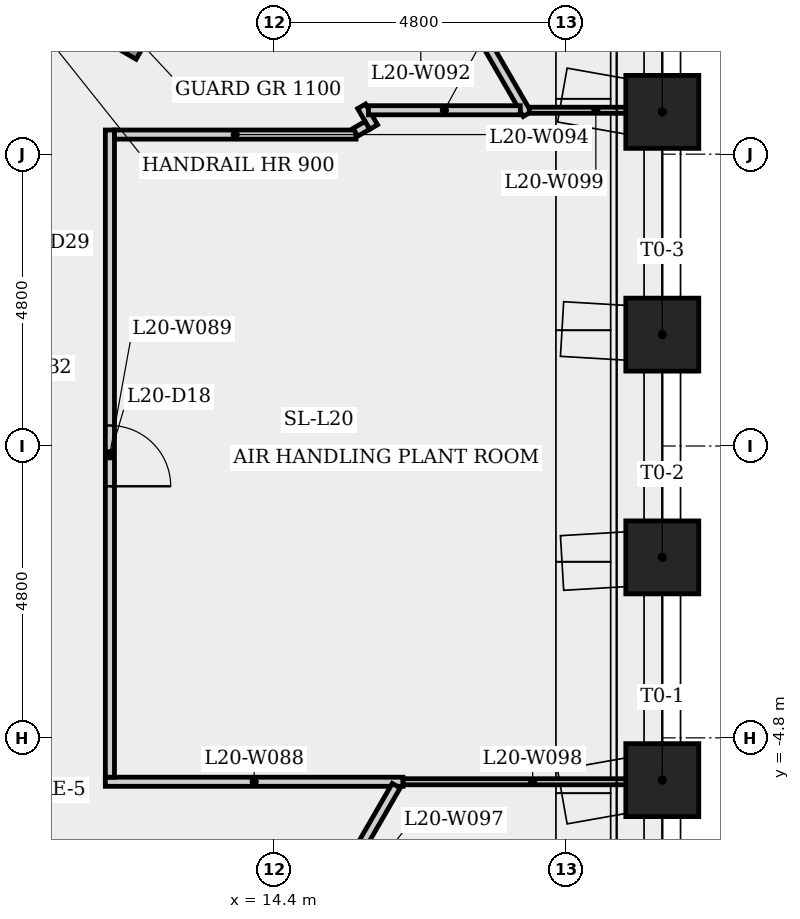
"""IFC4 building model, lengths in metres.
Left out: names, types, materials, properties, quantities, classifications, styles, units other than length and angle.
Written with IfcOpenShell. Run it as: python <this file> out.ifc"""

import sys

from ifc_helpers import new_model, si_unit, direction, frame, frame_2d, origin, origin_2d, place, context, subcontext, project, spatial, rectangle, extrude, element, fill, save


model = new_model("IFC4")
c1 = context("Model", 3, precision=1e-05, world=origin(), true_north=direction((0.0, 1.0)))
c2 = subcontext(c1, "Body", "Model", "MODEL_VIEW")
j1 = project(units=[si_unit("LENGTHUNIT", "METRE"), si_unit("PLANEANGLEUNIT", "RADIAN")], contexts=[c1])
p1 = place(None, origin())
s1 = spatial("IfcSite", under=j1, at=p1, CompositionType="ELEMENT")
p2 = place(p1, origin())
s2 = spatial("IfcBuilding", under=s1, at=p2, CompositionType="ELEMENT")
p3 = place(p2, frame((0.0, 0.0, 78.3)))
s3 = spatial("IfcBuildingStorey", under=s2, at=p3, CompositionType="ELEMENT", Elevation=78.3)
for number, where, z_axis, x_axis in (
    (1, (20.785, -5.495, 0.0), (0.0, 0.0, 1.0), (1.0, 0.0, 0.0)),
    (2, (20.785, -1.832, 0.0), (0.0, 0.0, 1.0), (1.0, 0.0, 0.0)),
    (3, (20.785, 1.832, 0.0), (0.0, 0.0, 1.0), (1.0, 0.0, 0.0)),
    (4, (20.785, 5.495, 0.0), (0.0, 0.0, 1.0), (1.0, 0.0, 0.0)),
):
    element("IfcColumn", number, at=place(p3, frame(where, z_axis=z_axis, x_axis=x_axis)), inside=s3, PredefinedType="COLUMN", context=c2, shape_type="SweptSolid", body=[
        extrude(rectangle(XDim=1.2, YDim=1.2, at=origin_2d()), origin(), (0.0, 0.0, 1.0), 4.45),
    ])
p4 = place(p3, frame((11.625, -5.522, 0.0), z_axis=(0.0, 0.0, 1.0), x_axis=(1.0, 0.0, 0.0)))
e5 = element("IfcWall", 5, at=p4, inside=s3, PredefinedType="PARTITIONING", context=c2, shape_type="SweptSolid", body=[
    extrude(rectangle(XDim=4.896, YDim=0.15, at=frame_2d((2.448, 0.0))), origin(), (0.0, 0.0, 1.0), 4.45),
])
p5 = place(p3, frame((11.7, 5.197, 0.0), z_axis=(0.0, 0.0, 1.0), x_axis=(0.0, -1.0, 0.0)))
e6 = element("IfcWall", 6, at=p5, inside=s3, PredefinedType="PARTITIONING", context=c2, shape_type="SweptSolid", body=[
    extrude(rectangle(XDim=10.645, YDim=0.15, at=frame_2d((5.322, 0.0))), origin(), (0.0, 0.0, 1.0), 4.45),
])
p6 = place(p5, frame((4.86, 0.0, 0.0)))
e7 = element("IfcOpeningElement", 7, at=p6, cuts=e6, PredefinedType="OPENING", context=c2, shape_type="SweptSolid", body=[
    extrude(rectangle(XDim=1.0, YDim=2.1, at=frame_2d((0.5, 1.05))), frame((0.0, 0.085, 0.0), z_axis=(0.0, -1.0, 0.0), x_axis=(1.0, 0.0, 0.0)), (0.0, 0.0, 1.0), 0.17),
])
p7 = place(p3, frame((12.194, 6.47, 0.0), z_axis=(0.0, 0.0, 1.0), x_axis=(-0.866025499775, 0.499999833739, 0.0)))
e8 = element("IfcWall", 8, at=p7, inside=s3, PredefinedType="SHEAR", context=c2, shape_type="SweptSolid", body=[
    extrude(rectangle(XDim=6.4, YDim=0.25, at=frame_2d((3.2, 0.0))), origin(), (0.0, 0.0, 1.0), 4.45),
])
p8 = place(p7, frame((5.25, 0.0, 0.0)))
e9 = element("IfcOpeningElement", 9, at=p8, cuts=e8, PredefinedType="OPENING", context=c2, shape_type="SweptSolid", body=[
    extrude(rectangle(XDim=1.0, YDim=2.1, at=frame_2d((0.5, 1.05))), frame((0.0, 0.135, 0.0), z_axis=(0.0, -1.0, 0.0), x_axis=(1.0, 0.0, 0.0)), (0.0, 0.0, 1.0), 0.27),
])
p9 = place(p3, frame((15.063, 11.517, 0.0), z_axis=(0.0, 0.0, 1.0), x_axis=(0.500015411963, -0.866016505501, 0.0)))
e10 = element("IfcWall", 10, at=p9, inside=s3, PredefinedType="PARTITIONING", context=c2, shape_type="SweptSolid", body=[
    extrude(rectangle(XDim=6.997, YDim=0.15, at=frame_2d((3.499, 0.0))), origin(), (0.0, 0.0, 1.0), 4.45),
])
p10 = place(p9, frame((2.944, 0.0, 0.0)))
e11 = element("IfcOpeningElement", 11, at=p10, cuts=e10, PredefinedType="OPENING", context=c2, shape_type="SweptSolid", body=[
    extrude(rectangle(XDim=1.0, YDim=2.1, at=frame_2d((0.5, 1.05))), frame((0.0, 0.085, 0.0), z_axis=(0.0, -1.0, 0.0), x_axis=(1.0, 0.0, 0.0)), (0.0, 0.0, 1.0), 0.17),
])
p11 = place(p3, frame((15.747, 5.122, 0.0), z_axis=(0.0, 0.0, 1.0), x_axis=(-1.0, 0.0, 0.0)))
e12 = element("IfcWall", 12, at=p11, inside=s3, PredefinedType="PARTITIONING", context=c2, shape_type="SweptSolid", body=[
    extrude(rectangle(XDim=3.972, YDim=0.15, at=frame_2d((1.986, 0.0))), origin(), (0.0, 0.0, 1.0), 4.45),
])
p12 = place(p3, frame((15.84, 5.587, 0.0), z_axis=(0.0, 0.0, 1.0), x_axis=(0.499740345343, -0.866175263579, 0.0)))
e13 = element("IfcWall", 13, at=p12, inside=s3, PredefinedType="PARTITIONING", context=c2, shape_type="SweptSolid", body=[
    extrude(rectangle(XDim=0.394, YDim=0.15, at=frame_2d((0.197, 0.0))), origin(), (0.0, 0.0, 1.0), 4.45),
])
p13 = place(p3, frame((15.934, 5.273, 0.0), z_axis=(0.0, 0.0, 1.0), x_axis=(-0.866256971229, -0.499598698754, 0.0)))
e14 = element("IfcWall", 14, at=p13, inside=s3, PredefinedType="PARTITIONING", context=c2, shape_type="SweptSolid", body=[
    extrude(rectangle(XDim=0.228, YDim=0.15, at=frame_2d((0.114, 0.0))), origin(), (0.0, 0.0, 1.0), 4.45),
])
p14 = place(p3, frame((16.408, -5.587, 0.0), z_axis=(0.0, 0.0, 1.0), x_axis=(-0.499988554908, -0.866032011511, 0.0)))
e15 = element("IfcWall", 15, at=p14, inside=s3, PredefinedType="PARTITIONING", context=c2, shape_type="SweptSolid", body=[
    extrude(rectangle(XDim=8.233, YDim=0.15, at=frame_2d((4.117, 0.0))), origin(), (0.0, 0.0, 1.0), 4.45),
])
p15 = place(p14, frame((3.566, 0.0, 0.0)))
e16 = element("IfcOpeningElement", 16, at=p15, cuts=e15, PredefinedType="OPENING", context=c2, shape_type="SweptSolid", body=[
    extrude(rectangle(XDim=1.1, YDim=2.1, at=frame_2d((0.55, 1.05))), frame((0.0, 0.085, 0.0), z_axis=(0.0, -1.0, 0.0), x_axis=(1.0, 0.0, 0.0)), (0.0, 0.0, 1.0), 0.17),
])
p16 = place(p3, frame((16.521, -5.522, 0.0), z_axis=(0.0, 0.0, 1.0), x_axis=(1.0, 0.0, 0.0)))
e17 = element("IfcWall", 17, at=p16, inside=s3, PredefinedType="PARTITIONING", context=c2, shape_type="SweptSolid", body=[
    extrude(rectangle(XDim=4.264, YDim=0.1, at=frame_2d((2.132, 0.0))), origin(), (0.0, 0.0, 1.0), 2.425),
])
p17 = place(p3, frame((18.599, 5.522, 0.0), z_axis=(0.0, 0.0, 1.0), x_axis=(1.0, 0.0, 0.0)))
e18 = element("IfcWall", 18, at=p17, inside=s3, PredefinedType="PARTITIONING", context=c2, shape_type="SweptSolid", body=[
    extrude(rectangle(XDim=2.185, YDim=0.1, at=frame_2d((1.093, 0.0))), origin(), (0.0, 0.0, 1.0), 2.425),
])
p18 = place(p3, frame((18.449, 5.522, 0.0), z_axis=(0.0, 0.0, 1.0), x_axis=(-1.0, 0.0, 0.0)))
e19 = element("IfcWall", 19, at=p18, inside=s3, PredefinedType="PARTITIONING", context=c2, shape_type="SweptSolid", body=[
    extrude(rectangle(XDim=2.498, YDim=0.15, at=frame_2d((1.249, 0.0))), origin(), (0.0, 0.0, 1.0), 4.45),
])
p19 = place(p6, origin())
e20 = element("IfcDoor", 20, at=p19, inside=s3, OperationType="SINGLE_SWING_RIGHT", PredefinedType="DOOR", context=c2, shape_type="SweptSolid", body=[
    extrude(rectangle(XDim=1.0, YDim=2.1, at=frame_2d((0.5, 1.05))), frame((0.0, 0.025, 0.0), z_axis=(0.0, -1.0, 0.0), x_axis=(1.0, 0.0, 0.0)), (0.0, 0.0, 1.0), 0.05),
])
fill(e7, e20)
save(model, sys.argv[1])
